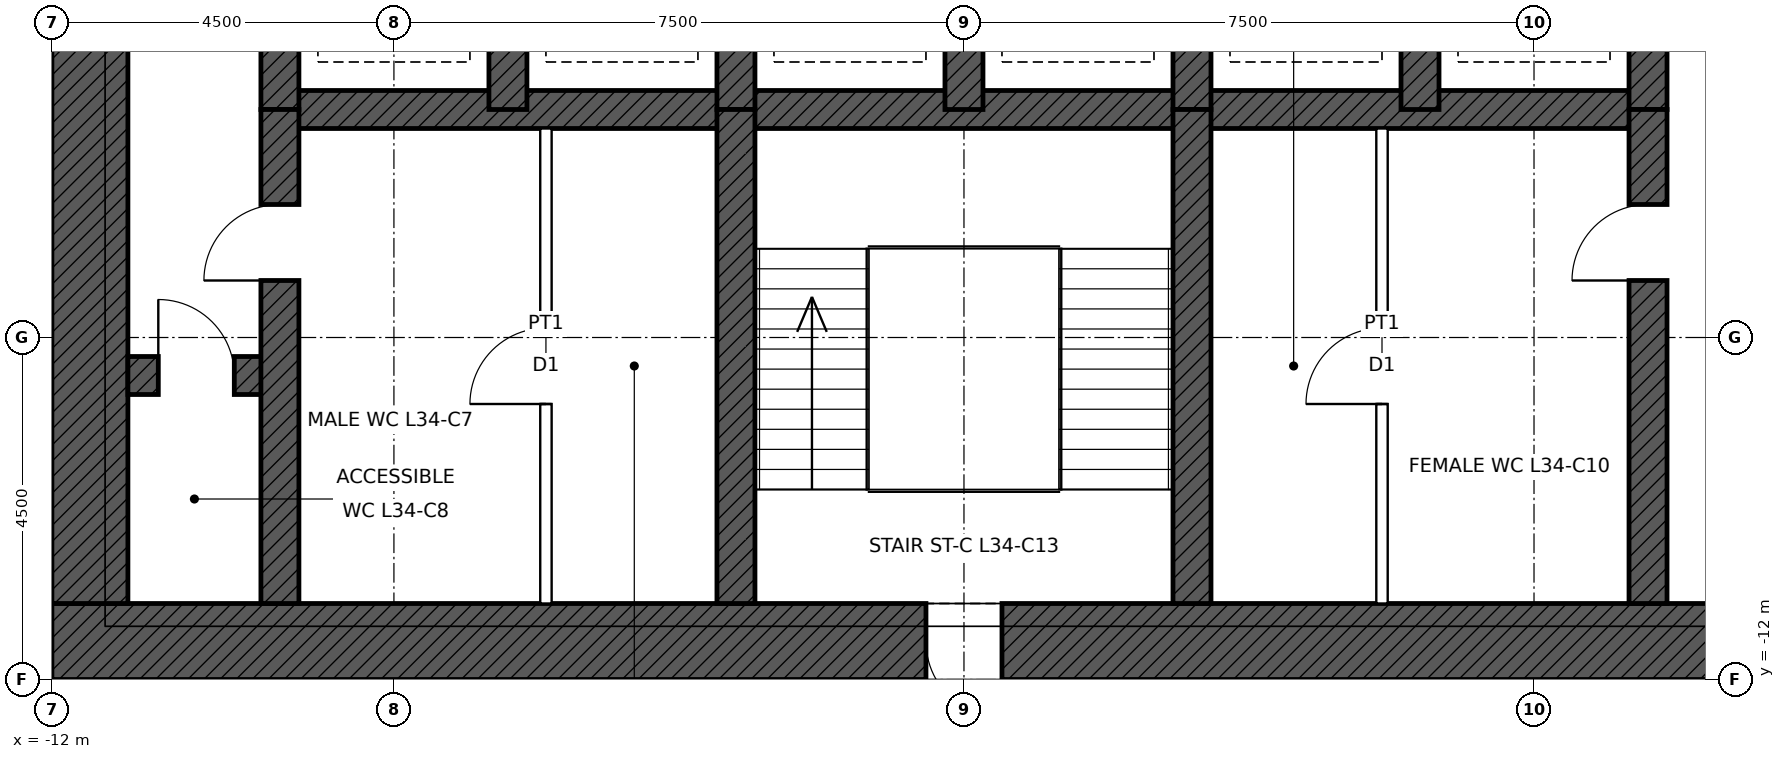
"""IFC4 building model, lengths in metres.
Left out: names, types, materials, properties, quantities, classifications, styles, units other than length and angle.
Written with IfcOpenShell. Run it as: python <this file> out.ifc"""

import sys

from ifc_helpers import new_model, si_unit, direction, frame, frame_2d, origin, place, context, subcontext, project, spatial, rectangle, extrude, element, fill, save


model = new_model("IFC4")
c1 = context("Model", 3, precision=1e-05, world=origin(), true_north=direction((0.0, 1.0)))
c2 = subcontext(c1, "Body", "Model", "MODEL_VIEW")
j1 = project(units=[si_unit("LENGTHUNIT", "METRE"), si_unit("PLANEANGLEUNIT", "RADIAN")], contexts=[c1])
p1 = place(None, origin())
s1 = spatial("IfcSite", under=j1, at=p1, CompositionType="ELEMENT")
p2 = place(p1, origin())
s2 = spatial("IfcBuilding", under=s1, at=p2, CompositionType="ELEMENT")
p3 = place(p2, frame((0.0, 0.0, 167.4)))
s3 = spatial("IfcBuildingStorey", under=s2, at=p3, CompositionType="ELEMENT", Elevation=167.4)
p4 = place(p3, frame((12.0, -11.5, 0.0), z_axis=(0.0, 0.0, 1.0), x_axis=(-1.0, 0.0, 0.0)))
e1 = element("IfcWall", 1, at=p4, inside=s3, PredefinedType="SHEAR", context=c2, shape_type="SweptSolid", body=[
    extrude(rectangle(XDim=24.0, YDim=1.0, at=frame_2d((12.0, 0.0))), origin(), (0.0, 0.0, 1.0), 4.5),
])
p5 = place(p4, frame((11.5, 0.0, 0.0)))
e2 = element("IfcOpeningElement", 2, at=p5, cuts=e1, PredefinedType="OPENING", context=c2, shape_type="SweptSolid", body=[
    extrude(rectangle(XDim=1.0, YDim=2.1, at=frame_2d((0.5, 1.05))), frame((0.0, 0.51, 0.0), z_axis=(0.0, -1.0, 0.0), x_axis=(1.0, 0.0, 0.0)), (0.0, 0.0, 1.0), 1.02),
])
p6 = place(p4, frame((1.0, 0.0, 0.0)))
e3 = element("IfcOpeningElement", 3, at=p6, cuts=e1, PredefinedType="OPENING", context=c2, shape_type="SweptSolid", body=[
    extrude(rectangle(XDim=1.0, YDim=2.4, at=frame_2d((0.5, 1.2))), frame((0.0, 0.51, 0.0), z_axis=(0.0, -1.0, 0.0), x_axis=(1.0, 0.0, 0.0)), (0.0, 0.0, 1.0), 1.02),
])
p7 = place(p3, frame((-11.5, -11.0, 0.0), z_axis=(0.0, 0.0, 1.0), x_axis=(0.0, 1.0, 0.0)))
e4 = element("IfcWall", 4, at=p7, inside=s3, PredefinedType="SHEAR", context=c2, shape_type="SweptSolid", body=[
    extrude(rectangle(XDim=22.0, YDim=1.0, at=frame_2d((11.0, 0.0))), origin(), (0.0, 0.0, 1.0), 4.5),
])
p8 = place(p7, frame((10.5, 0.0, 0.0)))
e5 = element("IfcOpeningElement", 5, at=p8, cuts=e4, PredefinedType="OPENING", context=c2, shape_type="SweptSolid", body=[
    extrude(rectangle(XDim=1.0, YDim=2.4, at=frame_2d((0.5, 1.2))), frame((0.0, 0.51, 0.0), z_axis=(0.0, -1.0, 0.0), x_axis=(1.0, 0.0, 0.0)), (0.0, 0.0, 1.0), 1.02),
])
p9 = place(p3, frame((-9.0, -4.5, 0.0), z_axis=(0.0, 0.0, 1.0), x_axis=(1.0, 0.0, 0.0)))
e6 = element("IfcWall", 6, at=p9, inside=s3, PredefinedType="SHEAR", context=c2, shape_type="SweptSolid", body=[
    extrude(rectangle(XDim=18.0, YDim=0.5, at=frame_2d((9.0, 0.0))), origin(), (0.0, 0.0, 1.0), 4.5),
])
p10 = place(p3, frame((-11.0, -8.0, 0.0), z_axis=(0.0, 0.0, 1.0), x_axis=(1.0, 0.0, 0.0)))
e7 = element("IfcWall", 7, at=p10, inside=s3, PredefinedType="SHEAR", context=c2, shape_type="SweptSolid", body=[
    extrude(rectangle(XDim=2.0, YDim=0.5, at=frame_2d((1.0, 0.0))), origin(), (0.0, 0.0, 1.0), 4.5),
])
p11 = place(p10, frame((0.4, 0.0, 0.0)))
e8 = element("IfcOpeningElement", 8, at=p11, cuts=e7, PredefinedType="OPENING", context=c2, shape_type="SweptSolid", body=[
    extrude(rectangle(XDim=1.0, YDim=2.1, at=frame_2d((0.5, 1.05))), frame((0.0, 0.26, 0.0), z_axis=(0.0, -1.0, 0.0), x_axis=(1.0, 0.0, 0.0)), (0.0, 0.0, 1.0), 0.52),
])
for number, where, z_axis, x_axis in (
    (9, (-9.0, -4.5, 0.0), (0.0, 0.0, 1.0), (0.0, 1.0, 0.0)),
    (10, (9.0, -4.5, 0.0), (0.0, 0.0, 1.0), (0.0, 1.0, 0.0)),
    (11, (-6.0, -4.5, 0.0), (0.0, 0.0, 1.0), (0.0, 1.0, 0.0)),
    (12, (-3.0, -4.5, 0.0), (0.0, 0.0, 1.0), (0.0, 1.0, 0.0)),
    (13, (0.0, -4.5, 0.0), (0.0, 0.0, 1.0), (0.0, 1.0, 0.0)),
    (14, (3.0, -4.5, 0.0), (0.0, 0.0, 1.0), (0.0, 1.0, 0.0)),
    (15, (6.0, -4.5, 0.0), (0.0, 0.0, 1.0), (0.0, 1.0, 0.0)),
):
    element("IfcWall", number, at=place(p3, frame(where, z_axis=z_axis, x_axis=x_axis)), inside=s3, PredefinedType="SHEAR", context=c2, shape_type="SweptSolid", body=[
        extrude(rectangle(XDim=3.0, YDim=0.5, at=frame_2d((1.5, 0.0))), origin(), (0.0, 0.0, 1.0), 4.5),
    ])
p12 = place(p3, frame((-9.0, -11.0, 0.0), z_axis=(0.0, 0.0, 1.0), x_axis=(0.0, 1.0, 0.0)))
e16 = element("IfcWall", 16, at=p12, inside=s3, PredefinedType="SHEAR", context=c2, shape_type="SweptSolid", body=[
    extrude(rectangle(XDim=6.5, YDim=0.5, at=frame_2d((3.25, 0.0))), origin(), (0.0, 0.0, 1.0), 4.5),
])
p13 = place(p12, frame((4.25, 0.0, 0.0)))
e17 = element("IfcOpeningElement", 17, at=p13, cuts=e16, PredefinedType="OPENING", context=c2, shape_type="SweptSolid", body=[
    extrude(rectangle(XDim=1.0, YDim=2.1, at=frame_2d((0.5, 1.05))), frame((0.0, 0.26, 0.0), z_axis=(0.0, -1.0, 0.0), x_axis=(1.0, 0.0, 0.0)), (0.0, 0.0, 1.0), 0.52),
])
p14 = place(p3, frame((9.0, -11.0, 0.0), z_axis=(0.0, 0.0, 1.0), x_axis=(0.0, 1.0, 0.0)))
e18 = element("IfcWall", 18, at=p14, inside=s3, PredefinedType="SHEAR", context=c2, shape_type="SweptSolid", body=[
    extrude(rectangle(XDim=6.5, YDim=0.5, at=frame_2d((3.25, 0.0))), origin(), (0.0, 0.0, 1.0), 4.5),
])
p15 = place(p14, frame((4.25, 0.0, 0.0)))
e19 = element("IfcOpeningElement", 19, at=p15, cuts=e18, PredefinedType="OPENING", context=c2, shape_type="SweptSolid", body=[
    extrude(rectangle(XDim=1.0, YDim=2.1, at=frame_2d((0.5, 1.05))), frame((0.0, 0.26, 0.0), z_axis=(0.0, -1.0, 0.0), x_axis=(1.0, 0.0, 0.0)), (0.0, 0.0, 1.0), 0.52),
])
for number, where, z_axis, x_axis in (
    (20, (-3.0, -11.0, 0.0), (0.0, 0.0, 1.0), (0.0, 1.0, 0.0)),
    (21, (3.0, -11.0, 0.0), (0.0, 0.0, 1.0), (0.0, 1.0, 0.0)),
):
    element("IfcWall", number, at=place(p3, frame(where, z_axis=z_axis, x_axis=x_axis)), inside=s3, PredefinedType="SHEAR", context=c2, shape_type="SweptSolid", body=[
        extrude(rectangle(XDim=6.5, YDim=0.5, at=frame_2d((3.25, 0.0))), origin(), (0.0, 0.0, 1.0), 4.5),
    ])
p16 = place(p3, frame((-5.5, -11.0, 0.0), z_axis=(0.0, 0.0, 1.0), x_axis=(0.0, 1.0, 0.0)))
e22 = element("IfcWall", 22, at=p16, inside=s3, PredefinedType="PARTITIONING", context=c2, shape_type="SweptSolid", body=[
    extrude(rectangle(XDim=6.25, YDim=0.15, at=frame_2d((3.125, 0.0))), origin(), (0.0, 0.0, 1.0), 4.25),
])
p17 = place(p16, frame((2.625, 0.0, 0.0)))
e23 = element("IfcOpeningElement", 23, at=p17, cuts=e22, PredefinedType="OPENING", context=c2, shape_type="SweptSolid", body=[
    extrude(rectangle(XDim=1.0, YDim=2.1, at=frame_2d((0.5, 1.05))), frame((0.0, 0.085, 0.0), z_axis=(0.0, -1.0, 0.0), x_axis=(1.0, 0.0, 0.0)), (0.0, 0.0, 1.0), 0.17),
])
p18 = place(p3, frame((5.5, -11.0, 0.0), z_axis=(0.0, 0.0, 1.0), x_axis=(0.0, 1.0, 0.0)))
e24 = element("IfcWall", 24, at=p18, inside=s3, PredefinedType="PARTITIONING", context=c2, shape_type="SweptSolid", body=[
    extrude(rectangle(XDim=6.25, YDim=0.15, at=frame_2d((3.125, 0.0))), origin(), (0.0, 0.0, 1.0), 4.25),
])
p19 = place(p18, frame((2.625, 0.0, 0.0)))
e25 = element("IfcOpeningElement", 25, at=p19, cuts=e24, PredefinedType="OPENING", context=c2, shape_type="SweptSolid", body=[
    extrude(rectangle(XDim=1.0, YDim=2.1, at=frame_2d((0.5, 1.05))), frame((0.0, 0.085, 0.0), z_axis=(0.0, -1.0, 0.0), x_axis=(1.0, 0.0, 0.0)), (0.0, 0.0, 1.0), 0.17),
])
p20 = place(p5, origin())
e26 = element("IfcDoor", 26, at=p20, inside=s3, OperationType="SINGLE_SWING_LEFT", PredefinedType="DOOR", context=c2, shape_type="SweptSolid", body=[
    extrude(rectangle(XDim=1.0, YDim=2.1, at=frame_2d((0.5, 1.05))), frame((0.0, 0.485, 0.0), z_axis=(0.0, -1.0, 0.0), x_axis=(1.0, 0.0, 0.0)), (0.0, 0.0, 1.0), 0.05),
])
fill(e2, e26)
p21 = place(p13, origin())
e27 = element("IfcDoor", 27, at=p21, inside=s3, OperationType="SINGLE_SWING_LEFT", PredefinedType="DOOR", context=c2, shape_type="SweptSolid", body=[
    extrude(rectangle(XDim=1.0, YDim=2.1, at=frame_2d((0.5, 1.05))), frame((0.0, 0.025, 0.0), z_axis=(0.0, -1.0, 0.0), x_axis=(1.0, 0.0, 0.0)), (0.0, 0.0, 1.0), 0.05),
])
fill(e17, e27)
p22 = place(p15, origin())
e28 = element("IfcDoor", 28, at=p22, inside=s3, OperationType="SINGLE_SWING_LEFT", PredefinedType="DOOR", context=c2, shape_type="SweptSolid", body=[
    extrude(rectangle(XDim=1.0, YDim=2.1, at=frame_2d((0.5, 1.05))), frame((0.0, 0.025, 0.0), z_axis=(0.0, -1.0, 0.0), x_axis=(1.0, 0.0, 0.0)), (0.0, 0.0, 1.0), 0.05),
])
fill(e19, e28)
p23 = place(p11, origin())
e29 = element("IfcDoor", 29, at=p23, inside=s3, OperationType="SINGLE_SWING_LEFT", PredefinedType="DOOR", context=c2, shape_type="SweptSolid", body=[
    extrude(rectangle(XDim=1.0, YDim=2.1, at=frame_2d((0.5, 1.05))), frame((0.0, 0.025, 0.0), z_axis=(0.0, -1.0, 0.0), x_axis=(1.0, 0.0, 0.0)), (0.0, 0.0, 1.0), 0.05),
])
fill(e8, e29)
p24 = place(p17, origin())
e30 = element("IfcDoor", 30, at=p24, inside=s3, OperationType="SINGLE_SWING_LEFT", PredefinedType="DOOR", context=c2, shape_type="SweptSolid", body=[
    extrude(rectangle(XDim=1.0, YDim=2.1, at=frame_2d((0.5, 1.05))), frame((0.0, 0.025, 0.0), z_axis=(0.0, -1.0, 0.0), x_axis=(1.0, 0.0, 0.0)), (0.0, 0.0, 1.0), 0.05),
])
fill(e23, e30)
p25 = place(p19, origin())
e31 = element("IfcDoor", 31, at=p25, inside=s3, OperationType="SINGLE_SWING_LEFT", PredefinedType="DOOR", context=c2, shape_type="SweptSolid", body=[
    extrude(rectangle(XDim=1.0, YDim=2.1, at=frame_2d((0.5, 1.05))), frame((0.0, 0.025, 0.0), z_axis=(0.0, -1.0, 0.0), x_axis=(1.0, 0.0, 0.0)), (0.0, 0.0, 1.0), 0.05),
])
fill(e25, e31)
save(model, sys.argv[1])
